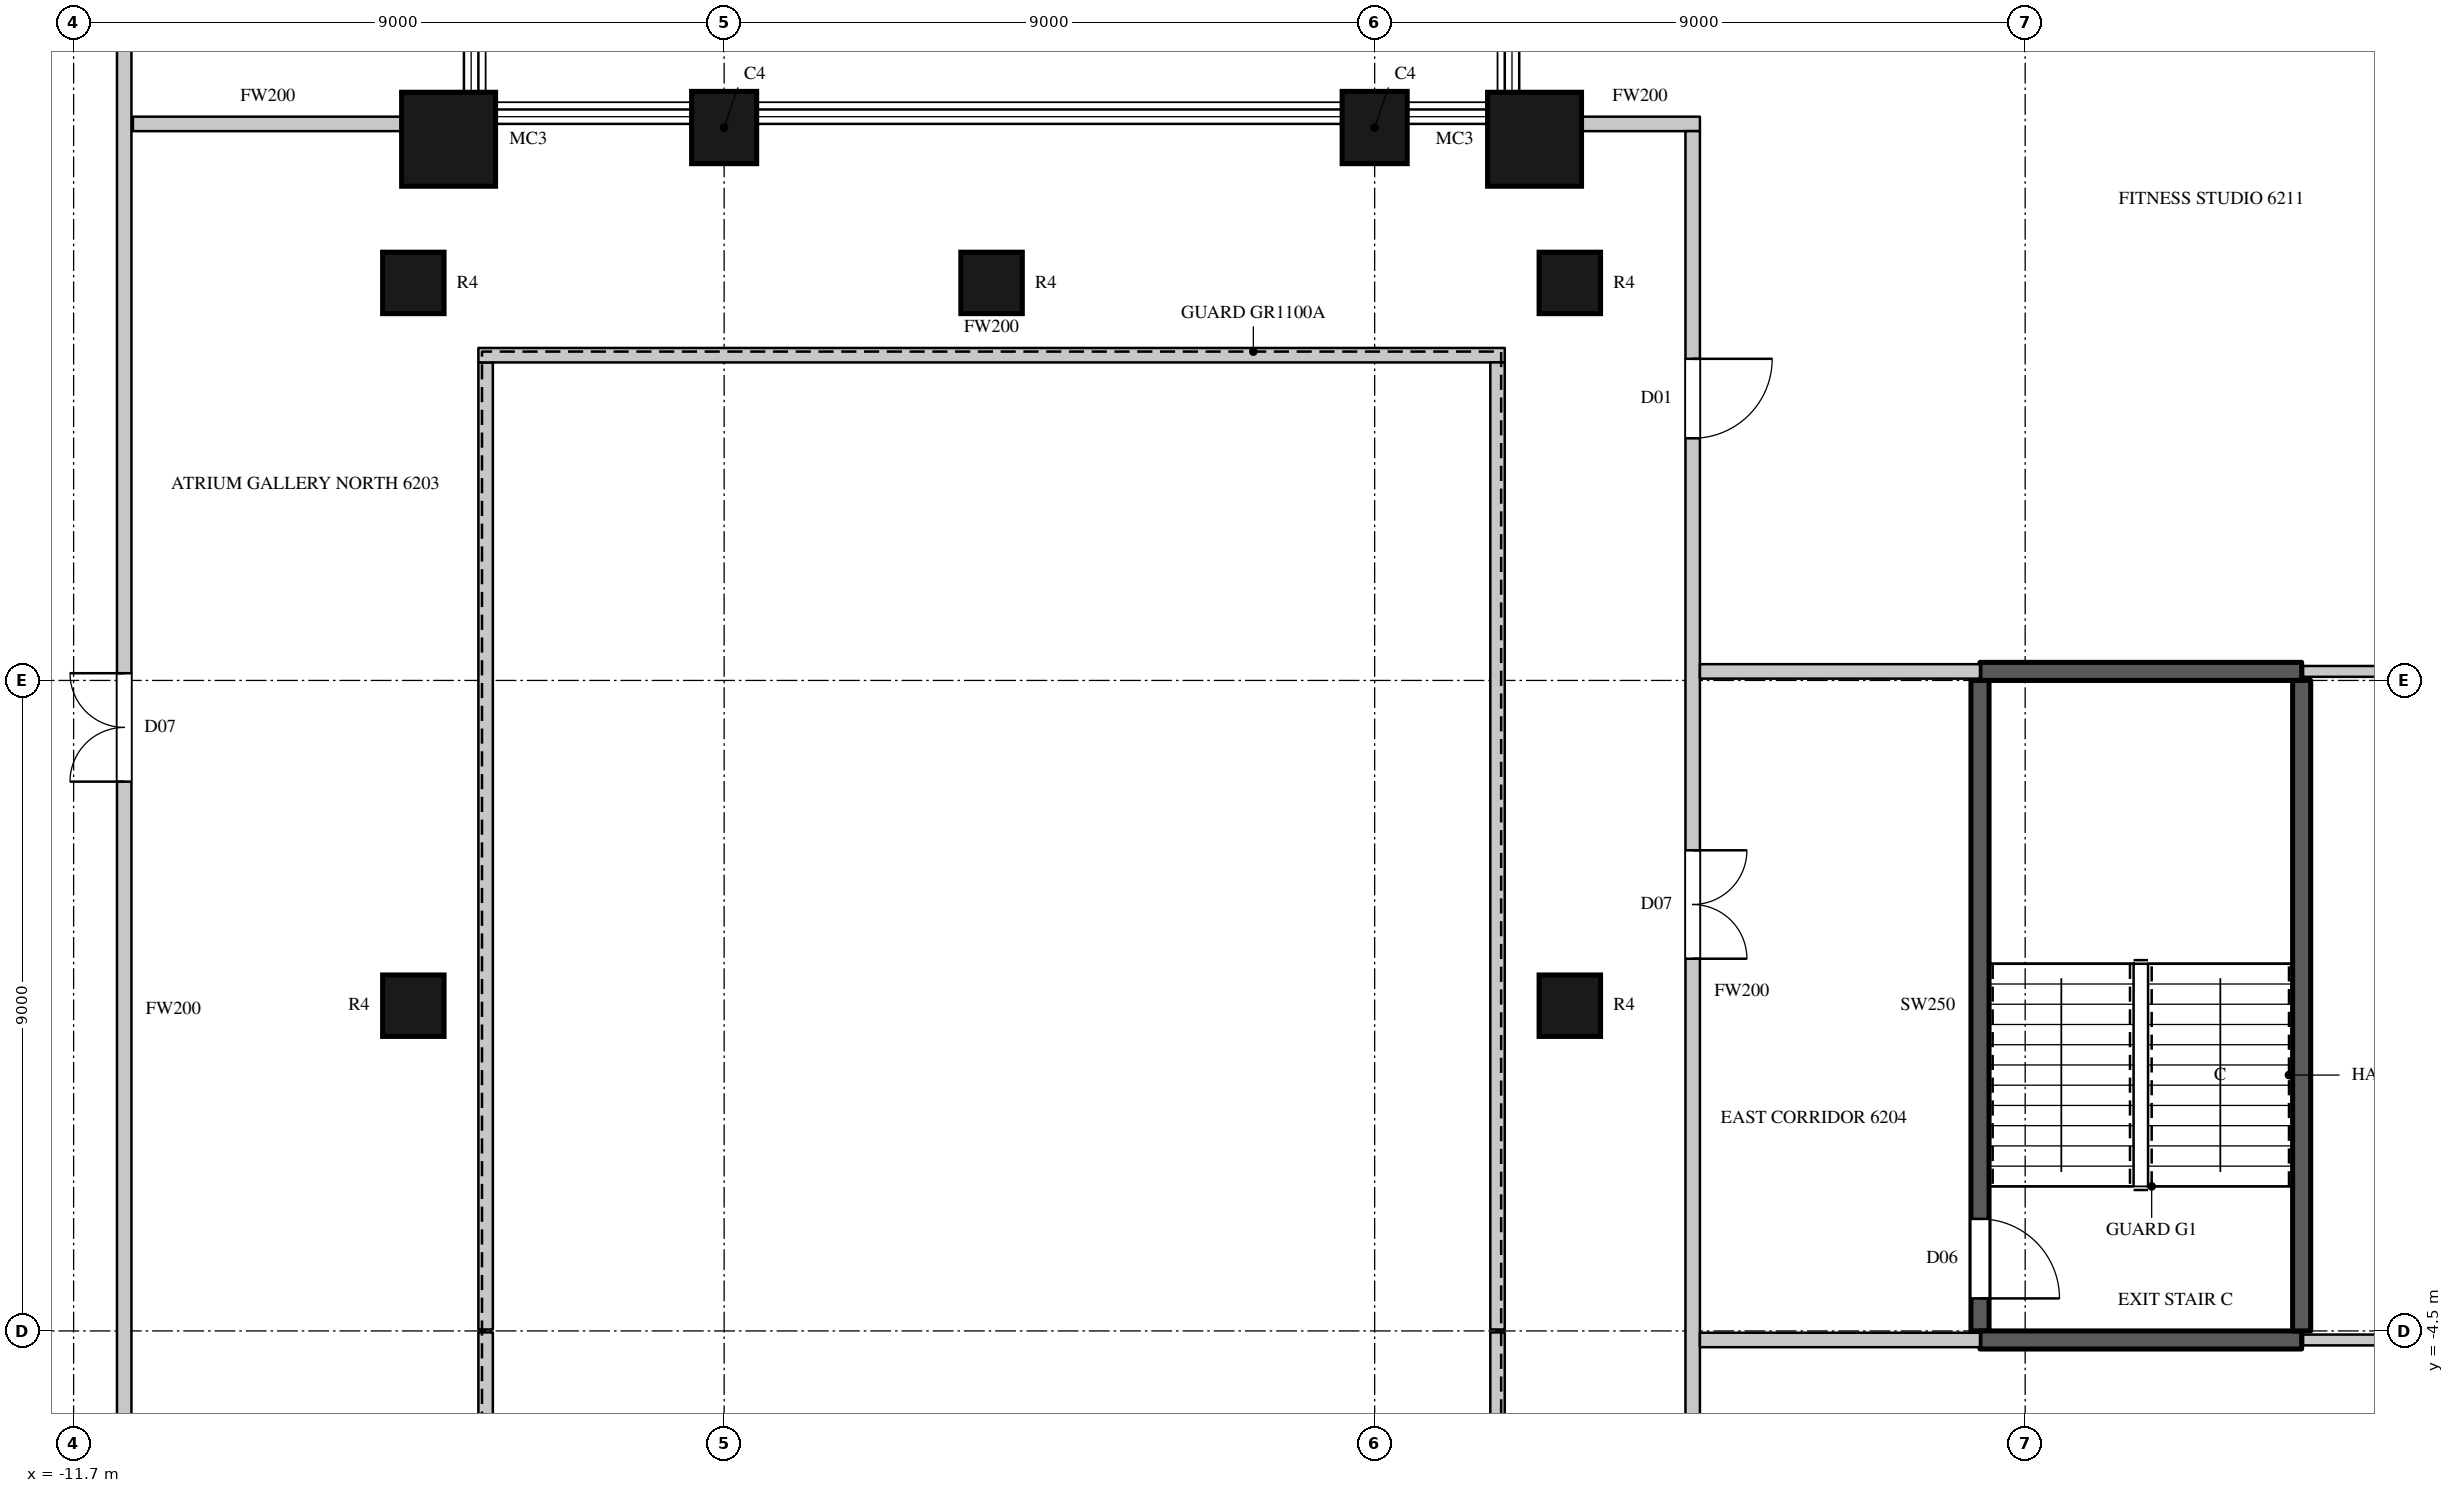
"""IFC4 building model, lengths in metres.
Left out: names, types, materials, properties, quantities, classifications, styles, units other than length and angle.
Written with IfcOpenShell. Run it as: python <this file> out.ifc"""

import sys

from ifc_helpers import new_model, si_unit, direction, frame, frame_2d, origin, origin_2d, place, context, subcontext, project, spatial, rectangle, circle, extrude, element, fill, save


model = new_model("IFC4")
c1 = context("Model", 3, precision=1e-05, world=origin(), true_north=direction((0.0, 1.0)))
c2 = subcontext(c1, "Body", "Model", "MODEL_VIEW")
j1 = project(units=[si_unit("LENGTHUNIT", "METRE"), si_unit("PLANEANGLEUNIT", "RADIAN")], contexts=[c1])
p1 = place(None, origin())
s1 = spatial("IfcSite", under=j1, at=p1, CompositionType="ELEMENT")
p2 = place(p1, origin())
s2 = spatial("IfcBuilding", under=s1, at=p2, CompositionType="ELEMENT")
p3 = place(p2, frame((0.0, 0.0, 276.2)))
s3 = spatial("IfcBuildingStorey", under=s2, at=p3, CompositionType="ELEMENT", Elevation=276.2)
p4 = place(p3, frame((8.512, 11.988, 0.0), z_axis=(0.0, 0.0, 1.0), x_axis=(1.0, 0.0, 0.0)))
e1 = element("IfcColumn", 1, at=p4, inside=s3, PredefinedType="COLUMN", context=c2, shape_type="SweptSolid", body=[
    extrude(circle(Radius=0.65, at=origin_2d()), origin(), (0.0, 0.0, 1.0), 4.1),
])
for number, where, z_axis, x_axis in (
    (2, (6.3, 12.15, 0.0), (0.0, 0.0, 1.0), (-1.0, 0.0, 0.0)),
    (3, (-2.7, 12.15, 0.0), (0.0, 0.0, 1.0), (-1.0, 0.0, 0.0)),
):
    element("IfcColumn", number, at=place(p3, frame(where, z_axis=z_axis, x_axis=x_axis)), inside=s3, PredefinedType="COLUMN", context=c2, shape_type="SweptSolid", body=[
        extrude(rectangle(XDim=0.9, YDim=1.0, at=origin_2d()), origin(), (0.0, 0.0, 1.0), 4.1),
    ])
p5 = place(p3, frame((-6.512, 11.988, 0.0), z_axis=(0.0, 0.0, 1.0), x_axis=(1.0, 0.0, 0.0)))
e4 = element("IfcColumn", 4, at=p5, inside=s3, PredefinedType="COLUMN", context=c2, shape_type="SweptSolid", body=[
    extrude(circle(Radius=0.65, at=origin_2d()), origin(), (0.0, 0.0, 1.0), 4.1),
])
for number, where, z_axis, x_axis in (
    (5, (-7.0, 0.0, 0.0), (0.0, 0.0, 1.0), (1.0, 0.0, 0.0)),
    (6, (-7.0, 10.0, 0.0), (0.0, 0.0, 1.0), (1.0, 0.0, 0.0)),
    (7, (1.0, 10.0, 0.0), (0.0, 0.0, 1.0), (1.0, 0.0, 0.0)),
    (8, (9.0, 0.0, 0.0), (0.0, 0.0, 1.0), (1.0, 0.0, 0.0)),
    (9, (9.0, 10.0, 0.0), (0.0, 0.0, 1.0), (1.0, 0.0, 0.0)),
):
    element("IfcColumn", number, at=place(p3, frame(where, z_axis=z_axis, x_axis=x_axis)), inside=s3, PredefinedType="COLUMN", context=c2, shape_type="SweptSolid", body=[
        extrude(circle(Radius=0.425, at=origin_2d()), origin(), (0.0, 0.0, 1.0), 4.1),
    ])
p6 = place(p3, frame((-11.0, -14.8, 0.0), z_axis=(0.0, 0.0, 1.0), x_axis=(0.0, 1.0, 0.0)))
e10 = element("IfcWall", 10, at=p6, inside=s3, PredefinedType="PARTITIONING", context=c2, shape_type="SweptSolid", body=[
    extrude(rectangle(XDim=29.5, YDim=0.2, at=frame_2d((14.75, 0.0))), origin(), (0.0, 0.0, 1.0), 3.8),
])
p7 = place(p6, frame((17.9, 0.0, 0.0)))
e11 = element("IfcOpeningElement", 11, at=p7, cuts=e10, PredefinedType="OPENING", context=c2, shape_type="SweptSolid", body=[
    extrude(rectangle(XDim=1.5, YDim=2.4, at=frame_2d((0.75, 1.2))), frame((0.0, 0.11, 0.0), z_axis=(0.0, -1.0, 0.0), x_axis=(1.0, 0.0, 0.0)), (0.0, 0.0, 1.0), 0.22),
])
p8 = place(p3, frame((-10.88, 12.2, 0.0), z_axis=(0.0, 0.0, 1.0), x_axis=(1.0, 0.0, 0.0)))
e12 = element("IfcWall", 12, at=p8, inside=s3, PredefinedType="PARTITIONING", context=c2, shape_type="SweptSolid", body=[
    extrude(rectangle(XDim=3.736, YDim=0.2, at=frame_2d((1.868, 0.0))), origin(), (0.0, 0.0, 1.0), 3.8),
])
p9 = place(p3, frame((-6.0, -8.9, 0.0), z_axis=(0.0, 0.0, 1.0), x_axis=(0.0, 1.0, 0.0)))
e13 = element("IfcWall", 13, at=p9, inside=s3, PredefinedType="PARTITIONING", context=c2, shape_type="SweptSolid", body=[
    extrude(rectangle(XDim=4.38, YDim=0.2, at=frame_2d((2.19, 0.0))), origin(), (0.0, 0.0, 1.0), 3.8),
])
p10 = place(p3, frame((-6.0, -4.48, 0.0), z_axis=(0.0, 0.0, 1.0), x_axis=(0.0, 1.0, 0.0)))
e14 = element("IfcWall", 14, at=p10, inside=s3, PredefinedType="PARTITIONING", context=c2, shape_type="SweptSolid", body=[
    extrude(rectangle(XDim=13.38, YDim=0.2, at=frame_2d((6.69, 0.0))), origin(), (0.0, 0.0, 1.0), 3.8),
])
p11 = place(p3, frame((-6.1, 9.0, 0.0), z_axis=(0.0, 0.0, 1.0), x_axis=(1.0, 0.0, 0.0)))
e15 = element("IfcWall", 15, at=p11, inside=s3, PredefinedType="PARTITIONING", context=c2, shape_type="SweptSolid", body=[
    extrude(rectangle(XDim=14.2, YDim=0.2, at=frame_2d((7.1, 0.0))), origin(), (0.0, 0.0, 1.0), 3.8),
])
p12 = place(p3, frame((8.0, -8.9, 0.0), z_axis=(0.0, 0.0, 1.0), x_axis=(0.0, 1.0, 0.0)))
e16 = element("IfcWall", 16, at=p12, inside=s3, PredefinedType="PARTITIONING", context=c2, shape_type="SweptSolid", body=[
    extrude(rectangle(XDim=4.38, YDim=0.2, at=frame_2d((2.19, 0.0))), origin(), (0.0, 0.0, 1.0), 3.8),
])
p13 = place(p3, frame((8.0, -4.48, 0.0), z_axis=(0.0, 0.0, 1.0), x_axis=(0.0, 1.0, 0.0)))
e17 = element("IfcWall", 17, at=p13, inside=s3, PredefinedType="PARTITIONING", context=c2, shape_type="SweptSolid", body=[
    extrude(rectangle(XDim=13.38, YDim=0.2, at=frame_2d((6.69, 0.0))), origin(), (0.0, 0.0, 1.0), 3.8),
])
p14 = place(p3, frame((9.144, 12.2, 0.0), z_axis=(0.0, 0.0, 1.0), x_axis=(1.0, 0.0, 0.0)))
e18 = element("IfcWall", 18, at=p14, inside=s3, PredefinedType="PARTITIONING", context=c2, shape_type="SweptSolid", body=[
    extrude(rectangle(XDim=1.656, YDim=0.2, at=frame_2d((0.828, 0.0))), origin(), (0.0, 0.0, 1.0), 3.8),
])
p15 = place(p3, frame((10.7, -11.7, 0.0), z_axis=(0.0, 0.0, 1.0), x_axis=(0.0, 1.0, 0.0)))
e19 = element("IfcWall", 19, at=p15, inside=s3, PredefinedType="PARTITIONING", context=c2, shape_type="SweptSolid", body=[
    extrude(rectangle(XDim=23.8, YDim=0.2, at=frame_2d((11.9, 0.0))), origin(), (0.0, 0.0, 1.0), 3.8),
])
p16 = place(p15, frame((12.35, 0.0, 0.0)))
e20 = element("IfcOpeningElement", 20, at=p16, cuts=e19, PredefinedType="OPENING", context=c2, shape_type="SweptSolid", body=[
    extrude(rectangle(XDim=1.5, YDim=2.4, at=frame_2d((0.75, 1.2))), frame((0.0, 0.11, 0.0), z_axis=(0.0, -1.0, 0.0), x_axis=(1.0, 0.0, 0.0)), (0.0, 0.0, 1.0), 0.22),
])
p17 = place(p15, frame((19.55, 0.0, 0.0)))
e21 = element("IfcOpeningElement", 21, at=p17, cuts=e19, PredefinedType="OPENING", context=c2, shape_type="SweptSolid", body=[
    extrude(rectangle(XDim=1.1, YDim=2.4, at=frame_2d((0.55, 1.2))), frame((0.0, 0.11, 0.0), z_axis=(0.0, -1.0, 0.0), x_axis=(1.0, 0.0, 0.0)), (0.0, 0.0, 1.0), 0.22),
])
p18 = place(p15, frame((4.25, 0.0, 0.0)))
e22 = element("IfcOpeningElement", 22, at=p18, cuts=e19, PredefinedType="OPENING", context=c2, shape_type="SweptSolid", body=[
    extrude(rectangle(XDim=1.1, YDim=2.4, at=frame_2d((0.55, 1.2))), frame((0.0, 0.11, 0.0), z_axis=(0.0, -1.0, 0.0), x_axis=(1.0, 0.0, 0.0)), (0.0, 0.0, 1.0), 0.22),
])
for number, where, z_axis, x_axis in (
    (23, (10.8, -4.625, 0.0), (0.0, 0.0, 1.0), (1.0, 0.0, 0.0)),
    (24, (10.8, 4.625, 0.0), (0.0, 0.0, 1.0), (1.0, 0.0, 0.0)),
):
    element("IfcWall", number, at=place(p3, frame(where, z_axis=z_axis, x_axis=x_axis)), inside=s3, PredefinedType="PARTITIONING", context=c2, shape_type="SweptSolid", body=[
        extrude(rectangle(XDim=3.875, YDim=0.2, at=frame_2d((1.938, 0.0))), origin(), (0.0, 0.0, 1.0), 3.8),
    ])
for number, where, z_axis, x_axis in (
    (25, (19.145, -4.625, 0.0), (0.0, 0.0, 1.0), (1.0, 0.0, 0.0)),
    (26, (19.145, 4.625, 0.0), (0.0, 0.0, 1.0), (1.0, 0.0, 0.0)),
):
    element("IfcWall", number, at=place(p3, frame(where, z_axis=z_axis, x_axis=x_axis)), inside=s3, PredefinedType="PARTITIONING", context=c2, shape_type="SweptSolid", body=[
        extrude(rectangle(XDim=4.605, YDim=0.15, at=frame_2d((2.302, 0.0))), origin(), (0.0, 0.0, 1.0), 3.8),
    ])
p19 = place(p3, frame((14.675, -4.5, 0.0), z_axis=(0.0, 0.0, 1.0), x_axis=(0.0, 1.0, 0.0)))
e27 = element("IfcWall", 27, at=p19, inside=s3, PredefinedType="SHEAR", context=c2, shape_type="SweptSolid", body=[
    extrude(rectangle(XDim=9.0, YDim=0.25, at=frame_2d((4.5, 0.0))), origin(), (0.0, 0.0, 1.0), 3.8),
])
p20 = place(p19, frame((0.45, 0.0, 0.0)))
e28 = element("IfcOpeningElement", 28, at=p20, cuts=e27, PredefinedType="OPENING", context=c2, shape_type="SweptSolid", body=[
    extrude(rectangle(XDim=1.1, YDim=2.2, at=frame_2d((0.55, 1.1))), frame((0.0, 0.135, 0.0), z_axis=(0.0, -1.0, 0.0), x_axis=(1.0, 0.0, 0.0)), (0.0, 0.0, 1.0), 0.27),
])
for number, where, z_axis, x_axis in (
    (29, (14.675, -4.625, 0.0), (0.0, 0.0, 1.0), (1.0, 0.0, 0.0)),
    (30, (14.675, 4.625, 0.0), (0.0, 0.0, 1.0), (1.0, 0.0, 0.0)),
):
    element("IfcWall", number, at=place(p3, frame(where, z_axis=z_axis, x_axis=x_axis)), inside=s3, PredefinedType="SHEAR", context=c2, shape_type="SweptSolid", body=[
        extrude(rectangle(XDim=4.45, YDim=0.25, at=frame_2d((2.225, 0.0))), origin(), (0.0, 0.0, 1.0), 3.8),
    ])
p21 = place(p3, frame((19.125, -4.5, 0.0), z_axis=(0.0, 0.0, 1.0), x_axis=(0.0, 1.0, 0.0)))
e31 = element("IfcWall", 31, at=p21, inside=s3, PredefinedType="SHEAR", context=c2, shape_type="SweptSolid", body=[
    extrude(rectangle(XDim=9.0, YDim=0.25, at=frame_2d((4.5, 0.0))), origin(), (0.0, 0.0, 1.0), 3.8),
])
p22 = place(p7, origin())
e32 = element("IfcDoor", 32, at=p22, inside=s3, OperationType="DOUBLE_DOOR_SINGLE_SWING", PredefinedType="DOOR", context=c2, shape_type="SweptSolid", body=[
    extrude(rectangle(XDim=1.5, YDim=2.4, at=frame_2d((0.75, 1.2))), frame((0.0, 0.025, 0.0), z_axis=(0.0, -1.0, 0.0), x_axis=(1.0, 0.0, 0.0)), (0.0, 0.0, 1.0), 0.05),
])
fill(e11, e32)
p23 = place(p16, origin())
e33 = element("IfcDoor", 33, at=p23, inside=s3, OperationType="DOUBLE_DOOR_SINGLE_SWING", PredefinedType="DOOR", context=c2, shape_type="SweptSolid", body=[
    extrude(rectangle(XDim=1.5, YDim=2.4, at=frame_2d((0.75, 1.2))), frame((0.0, 0.025, 0.0), z_axis=(0.0, -1.0, 0.0), x_axis=(1.0, 0.0, 0.0)), (0.0, 0.0, 1.0), 0.05),
])
fill(e20, e33)
p24 = place(p17, origin())
e34 = element("IfcDoor", 34, at=p24, inside=s3, OperationType="SINGLE_SWING_LEFT", PredefinedType="DOOR", context=c2, shape_type="SweptSolid", body=[
    extrude(rectangle(XDim=1.1, YDim=2.4, at=frame_2d((0.55, 1.2))), frame((0.0, 0.025, 0.0), z_axis=(0.0, -1.0, 0.0), x_axis=(1.0, 0.0, 0.0)), (0.0, 0.0, 1.0), 0.05),
])
fill(e21, e34)
p25 = place(p20, origin())
e35 = element("IfcDoor", 35, at=p25, inside=s3, OperationType="SINGLE_SWING_RIGHT", PredefinedType="DOOR", context=c2, shape_type="SweptSolid", body=[
    extrude(rectangle(XDim=1.1, YDim=2.2, at=frame_2d((0.55, 1.1))), frame((0.0, 0.025, 0.0), z_axis=(0.0, -1.0, 0.0), x_axis=(1.0, 0.0, 0.0)), (0.0, 0.0, 1.0), 0.05),
])
fill(e28, e35)
save(model, sys.argv[1])
